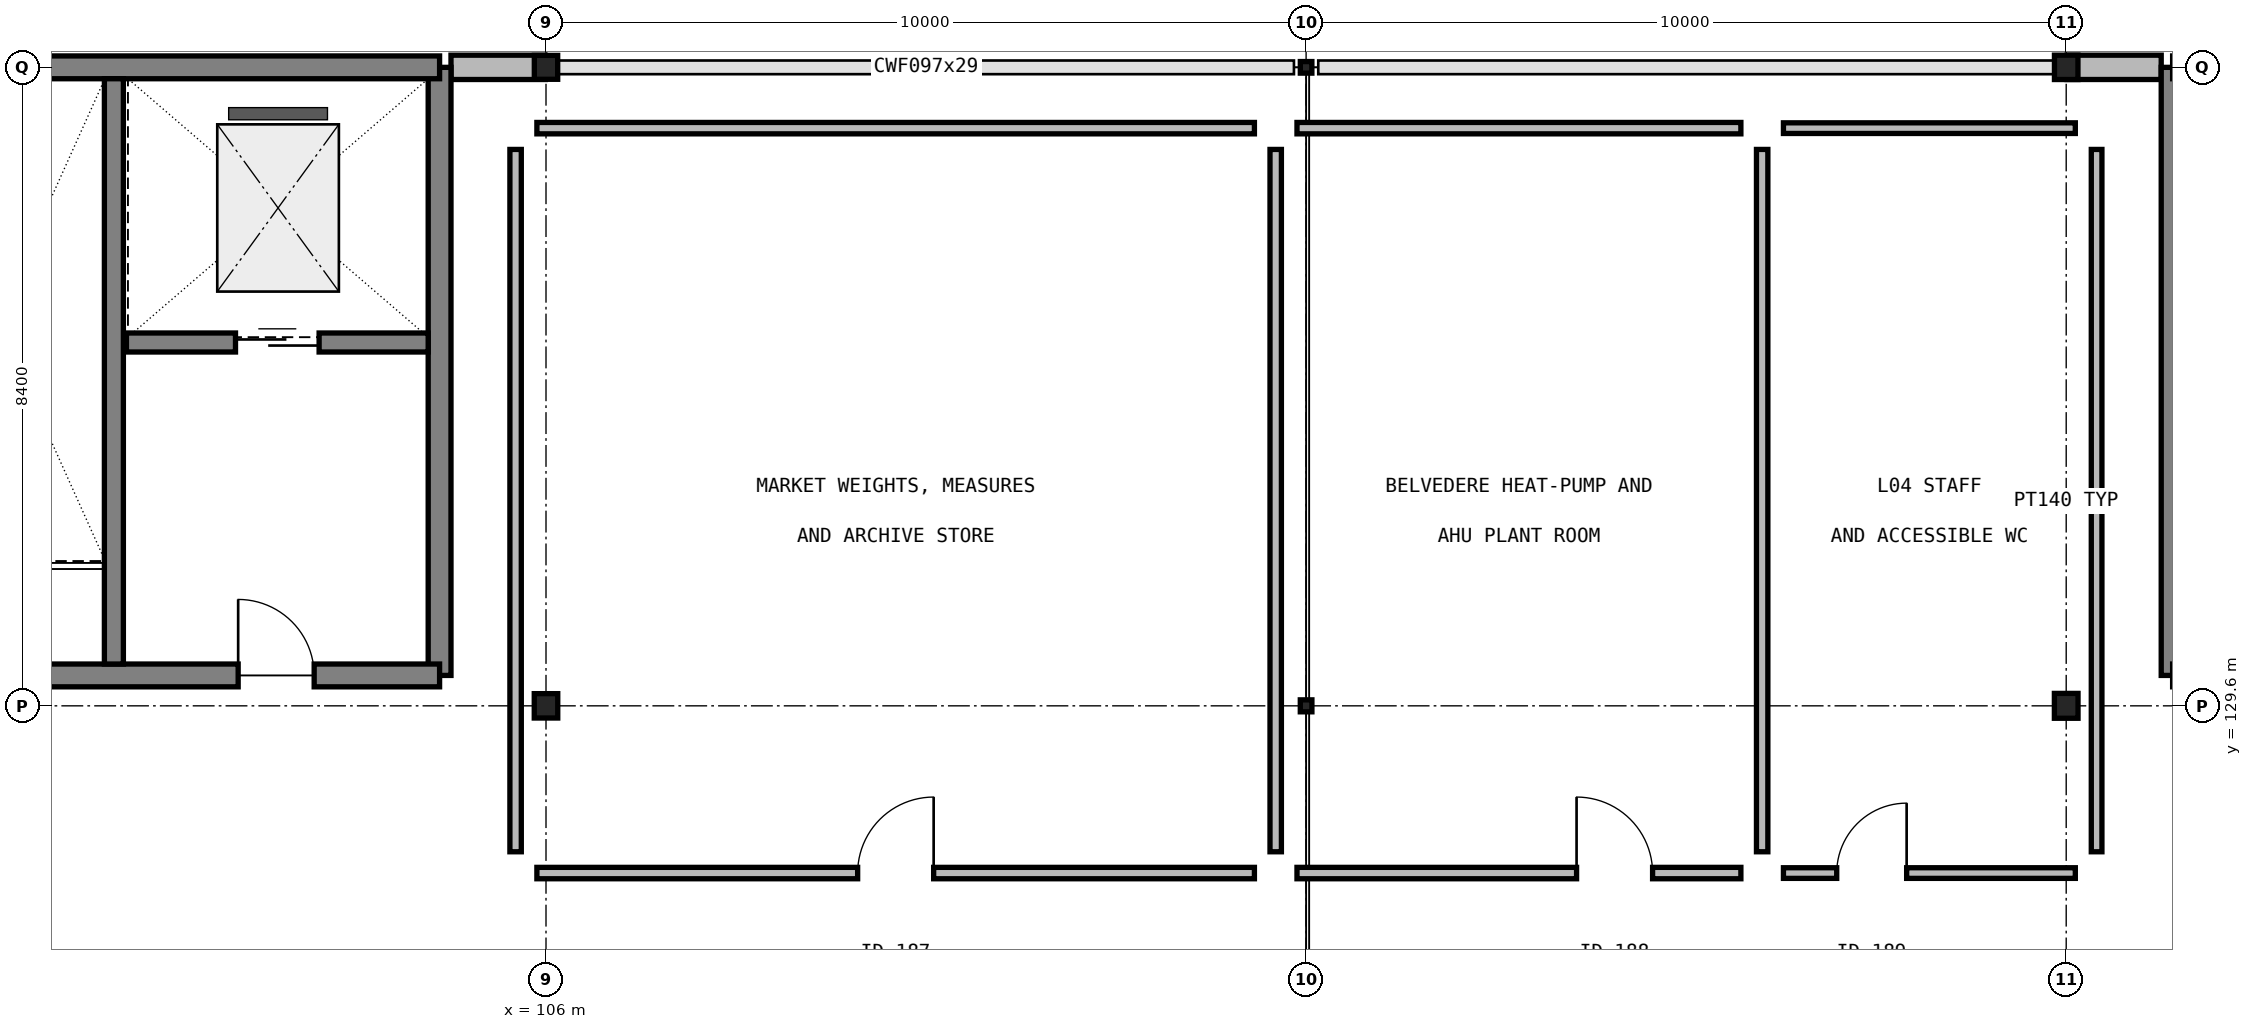
"""IFC4 building model, lengths in metres.
Left out: names, types, materials, properties, quantities, classifications, styles, units other than length and angle.
Written with IfcOpenShell. Run it as: python <this file> out.ifc"""

import sys

from ifc_helpers import new_model, si_unit, direction, frame, frame_2d, origin, origin_2d_with_axis, place, context, subcontext, project, spatial, rectangle, i_section, extrude, element, fill, save


model = new_model("IFC4")
c1 = context("Model", 3, precision=1e-05, world=origin(), true_north=direction((0.0, 1.0)))
c2 = subcontext(c1, "Body", "Model", "MODEL_VIEW")
j1 = project(units=[si_unit("LENGTHUNIT", "METRE"), si_unit("PLANEANGLEUNIT", "RADIAN")], contexts=[c1])
p1 = place(None, origin())
s1 = spatial("IfcSite", under=j1, at=p1, CompositionType="ELEMENT")
p2 = place(p1, origin())
s2 = spatial("IfcBuilding", under=s1, at=p2, CompositionType="ELEMENT")
p3 = place(p2, frame((0.0, 0.0, 15.3)))
s3 = spatial("IfcBuildingStorey", under=s2, at=p3, CompositionType="ELEMENT", Elevation=15.3)
p4 = place(p3, frame((106.0, 129.6, 0.0), z_axis=(0.0, 0.0, 1.0), x_axis=(1.0, 0.0, 0.0)))
e1 = element("IfcColumn", 1, at=p4, inside=s3, PredefinedType="COLUMN", context=c2, shape_type="SweptSolid", body=[
    extrude(i_section(OverallWidth=0.309, OverallDepth=0.321, WebThickness=0.014, FlangeThickness=0.022, FilletRadius=0.017, at=origin_2d_with_axis()), origin(), (0.0, 0.0, 1.0), 3.3),
])
p5 = place(p3, frame((106.0, 138.0, 0.0), z_axis=(0.0, 0.0, 1.0), x_axis=(1.0, 0.0, 0.0)))
e2 = element("IfcColumn", 2, at=p5, inside=s3, PredefinedType="COLUMN", context=c2, shape_type="SweptSolid", body=[
    extrude(i_section(OverallWidth=0.307, OverallDepth=0.315, WebThickness=0.012, FlangeThickness=0.019, FilletRadius=0.017, at=origin_2d_with_axis()), origin(), (0.0, 0.0, 1.0), 3.3),
])
p6 = place(p3, frame((116.0, 129.6, 0.0), z_axis=(0.0, 0.0, 1.0), x_axis=(1.0, 0.0, 0.0)))
e3 = element("IfcColumn", 3, at=p6, inside=s3, PredefinedType="COLUMN", context=c2, shape_type="SweptSolid", body=[
    extrude(i_section(OverallWidth=0.153, OverallDepth=0.158, WebThickness=0.007, FlangeThickness=0.01, FilletRadius=0.009, at=origin_2d_with_axis()), origin(), (0.0, 0.0, 1.0), 3.3),
])
p7 = place(p3, frame((116.0, 138.0, 0.0), z_axis=(0.0, 0.0, 1.0), x_axis=(1.0, 0.0, 0.0)))
e4 = element("IfcColumn", 4, at=p7, inside=s3, PredefinedType="COLUMN", context=c2, shape_type="SweptSolid", body=[
    extrude(i_section(OverallWidth=0.152, OverallDepth=0.152, WebThickness=0.006, FlangeThickness=0.007, FilletRadius=0.009, at=origin_2d_with_axis()), origin(), (0.0, 0.0, 1.0), 3.3),
])
p8 = place(p3, frame((126.0, 129.6, 0.0), z_axis=(0.0, 0.0, 1.0), x_axis=(1.0, 0.0, 0.0)))
e5 = element("IfcColumn", 5, at=p8, inside=s3, PredefinedType="COLUMN", context=c2, shape_type="SweptSolid", body=[
    extrude(i_section(OverallWidth=0.311, OverallDepth=0.327, WebThickness=0.016, FlangeThickness=0.025, FilletRadius=0.017, at=origin_2d_with_axis()), origin(), (0.0, 0.0, 1.0), 3.3),
])
p9 = place(p3, frame((126.0, 138.0, 0.0), z_axis=(0.0, 0.0, 1.0), x_axis=(1.0, 0.0, 0.0)))
e6 = element("IfcColumn", 6, at=p9, inside=s3, PredefinedType="COLUMN", context=c2, shape_type="SweptSolid", body=[
    extrude(i_section(OverallWidth=0.309, OverallDepth=0.321, WebThickness=0.014, FlangeThickness=0.022, FilletRadius=0.017, at=origin_2d_with_axis()), origin(), (0.0, 0.0, 1.0), 3.3),
])
p10 = place(p3, frame((105.99, 138.0, 0.0), z_axis=(0.0, 0.0, 1.0), x_axis=(-1.0, 0.0, 0.0)))
e7 = element("IfcWall", 7, at=p10, inside=s3, PredefinedType="SOLIDWALL", context=c2, shape_type="SweptSolid", body=[
    extrude(rectangle(XDim=1.24, YDim=0.32, at=frame_2d((0.62, 0.0), x_axis=(1.0, 0.0))), origin(), (0.0, 0.0, 1.0), 2.94),
])
p11 = place(p3, frame((127.25, 138.0, 0.0), z_axis=(0.0, 0.0, 1.0), x_axis=(-1.0, 0.0, 0.0)))
e8 = element("IfcWall", 8, at=p11, inside=s3, PredefinedType="SOLIDWALL", context=c2, shape_type="SweptSolid", body=[
    extrude(rectangle(XDim=1.239, YDim=0.32, at=frame_2d((0.62, 0.0), x_axis=(1.0, 0.0))), origin(), (0.0, 0.0, 1.0), 2.94),
])
p12 = place(p3, frame((104.6, 130.0, 0.0), z_axis=(0.0, 0.0, 1.0), x_axis=(0.0, 1.0, 0.0)))
e9 = element("IfcWall", 9, at=p12, inside=s3, PredefinedType="SHEAR", context=c2, shape_type="SweptSolid", body=[
    extrude(rectangle(XDim=8.0, YDim=0.3, at=frame_2d((4.0, 0.0), x_axis=(1.0, 0.0))), origin(), (0.0, 0.0, 1.0), 3.09),
])
p13 = place(p3, frame((97.2, 130.0, 0.0), z_axis=(0.0, 0.0, 1.0), x_axis=(1.0, 0.0, 0.0)))
e10 = element("IfcWall", 10, at=p13, inside=s3, PredefinedType="SHEAR", context=c2, shape_type="SweptSolid", body=[
    extrude(rectangle(XDim=7.4, YDim=0.3, at=frame_2d((3.7, 0.0), x_axis=(1.0, 0.0))), origin(), (0.0, 0.0, 1.0), 3.09),
])
p14 = place(p13, frame((1.1, 0.0, 0.0)))
e11 = element("IfcOpeningElement", 11, at=p14, cuts=e10, PredefinedType="OPENING", context=c2, shape_type="SweptSolid", body=[
    extrude(rectangle(XDim=1.0, YDim=2.15, at=frame_2d((0.5, 1.075), x_axis=(1.0, 0.0))), frame((0.0, 0.16, 0.0), z_axis=(0.0, -1.0, 0.0), x_axis=(1.0, 0.0, 0.0)), (0.0, 0.0, 1.0), 0.32),
])
p15 = place(p13, frame((4.75, 0.0, 0.0)))
e12 = element("IfcOpeningElement", 12, at=p15, cuts=e10, PredefinedType="OPENING", context=c2, shape_type="SweptSolid", body=[
    extrude(rectangle(XDim=1.0, YDim=2.15, at=frame_2d((0.5, 1.075), x_axis=(1.0, 0.0))), frame((0.0, 0.16, 0.0), z_axis=(0.0, -1.0, 0.0), x_axis=(1.0, 0.0, 0.0)), (0.0, 0.0, 1.0), 0.32),
])
p16 = place(p3, frame((104.6, 138.0, 0.0), z_axis=(0.0, 0.0, 1.0), x_axis=(-1.0, 0.0, 0.0)))
e13 = element("IfcWall", 13, at=p16, inside=s3, PredefinedType="SHEAR", context=c2, shape_type="SweptSolid", body=[
    extrude(rectangle(XDim=7.4, YDim=0.3, at=frame_2d((3.7, 0.0), x_axis=(1.0, 0.0))), origin(), (0.0, 0.0, 1.0), 3.09),
])
p17 = place(p3, frame((100.315, 130.15, 0.0), z_axis=(0.0, 0.0, 1.0), x_axis=(0.0, 1.0, 0.0)))
e14 = element("IfcWall", 14, at=p17, inside=s3, PredefinedType="SHEAR", context=c2, shape_type="SweptSolid", body=[
    extrude(rectangle(XDim=7.7, YDim=0.25, at=frame_2d((3.85, 0.0), x_axis=(1.0, 0.0))), origin(), (0.0, 0.0, 1.0), 3.09),
])
p18 = place(p3, frame((100.48, 134.38, 0.0), z_axis=(0.0, 0.0, 1.0), x_axis=(1.0, 0.0, 0.0)))
e15 = element("IfcWall", 15, at=p18, inside=s3, PredefinedType="SHEAR", context=c2, shape_type="SweptSolid", body=[
    extrude(rectangle(XDim=3.97, YDim=0.25, at=frame_2d((1.985, 0.0), x_axis=(1.0, 0.0))), origin(), (0.0, 0.0, 1.0), 3.09),
])
p19 = place(p18, frame((1.435, 0.0, 0.0)))
e16 = element("IfcOpeningElement", 16, at=p19, cuts=e15, PredefinedType="OPENING", context=c2, shape_type="SweptSolid", body=[
    extrude(rectangle(XDim=1.1, YDim=2.15, at=frame_2d((0.55, 1.075), x_axis=(1.0, 0.0))), frame((0.0, 0.135, 0.0), z_axis=(0.0, -1.0, 0.0), x_axis=(1.0, 0.0, 0.0)), (0.0, 0.0, 1.0), 0.27),
])
p20 = place(p3, frame((127.4, 138.0, 0.0), z_axis=(0.0, 0.0, 1.0), x_axis=(0.0, -1.0, 0.0)))
e17 = element("IfcWall", 17, at=p20, inside=s3, PredefinedType="SHEAR", context=c2, shape_type="SweptSolid", body=[
    extrude(rectangle(XDim=8.0, YDim=0.3, at=frame_2d((4.0, 0.0), x_axis=(1.0, 0.0))), origin(), (0.0, 0.0, 1.0), 3.09),
])
p21 = place(p3, frame((134.8, 138.0, 0.0), z_axis=(0.0, 0.0, 1.0), x_axis=(-1.0, 0.0, 0.0)))
e18 = element("IfcWall", 18, at=p21, inside=s3, PredefinedType="SHEAR", context=c2, shape_type="SweptSolid", body=[
    extrude(rectangle(XDim=7.4, YDim=0.3, at=frame_2d((3.7, 0.0), x_axis=(1.0, 0.0))), origin(), (0.0, 0.0, 1.0), 3.09),
])
p22 = place(p3, frame((105.88, 127.4, 0.0), z_axis=(0.0, 0.0, 1.0), x_axis=(1.0, 0.0, 0.0)))
e19 = element("IfcWall", 19, at=p22, inside=s3, PredefinedType="PARTITIONING", context=c2, shape_type="SweptSolid", body=[
    extrude(rectangle(XDim=9.44, YDim=0.15, at=frame_2d((4.72, 0.0), x_axis=(1.0, 0.0))), origin(), (0.0, 0.0, 1.0), 2.47),
])
p23 = place(p22, frame((4.22, 0.0, 0.0)))
e20 = element("IfcOpeningElement", 20, at=p23, cuts=e19, PredefinedType="OPENING", context=c2, shape_type="SweptSolid", body=[
    extrude(rectangle(XDim=1.0, YDim=2.15, at=frame_2d((0.5, 1.075), x_axis=(1.0, 0.0))), frame((0.0, 0.085, 0.0), z_axis=(0.0, -1.0, 0.0), x_axis=(1.0, 0.0, 0.0)), (0.0, 0.0, 1.0), 0.17),
])
p24 = place(p3, frame((115.6, 127.68, 0.0), z_axis=(0.0, 0.0, 1.0), x_axis=(0.0, 1.0, 0.0)))
e21 = element("IfcWall", 21, at=p24, inside=s3, PredefinedType="PARTITIONING", context=c2, shape_type="SweptSolid", body=[
    extrude(rectangle(XDim=9.24, YDim=0.15, at=frame_2d((4.62, 0.0), x_axis=(1.0, 0.0))), origin(), (0.0, 0.0, 1.0), 2.47),
])
p25 = place(p3, frame((115.32, 137.2, 0.0), z_axis=(0.0, 0.0, 1.0), x_axis=(-1.0, 0.0, 0.0)))
e22 = element("IfcWall", 22, at=p25, inside=s3, PredefinedType="PARTITIONING", context=c2, shape_type="SweptSolid", body=[
    extrude(rectangle(XDim=9.44, YDim=0.15, at=frame_2d((4.72, 0.0), x_axis=(1.0, 0.0))), origin(), (0.0, 0.0, 1.0), 2.47),
])
p26 = place(p3, frame((105.6, 136.92, 0.0), z_axis=(0.0, 0.0, 1.0), x_axis=(0.0, -1.0, 0.0)))
e23 = element("IfcWall", 23, at=p26, inside=s3, PredefinedType="PARTITIONING", context=c2, shape_type="SweptSolid", body=[
    extrude(rectangle(XDim=9.24, YDim=0.15, at=frame_2d((4.62, 0.0), x_axis=(1.0, 0.0))), origin(), (0.0, 0.0, 1.0), 2.47),
])
p27 = place(p3, frame((115.88, 127.4, 0.0), z_axis=(0.0, 0.0, 1.0), x_axis=(1.0, 0.0, 0.0)))
e24 = element("IfcWall", 24, at=p27, inside=s3, PredefinedType="PARTITIONING", context=c2, shape_type="SweptSolid", body=[
    extrude(rectangle(XDim=5.84, YDim=0.15, at=frame_2d((2.92, 0.0), x_axis=(1.0, 0.0))), origin(), (0.0, 0.0, 1.0), 2.47),
])
p28 = place(p27, frame((3.678, 0.0, 0.0)))
e25 = element("IfcOpeningElement", 25, at=p28, cuts=e24, PredefinedType="OPENING", context=c2, shape_type="SweptSolid", body=[
    extrude(rectangle(XDim=1.0, YDim=2.15, at=frame_2d((0.5, 1.075), x_axis=(1.0, 0.0))), frame((0.0, 0.085, 0.0), z_axis=(0.0, -1.0, 0.0), x_axis=(1.0, 0.0, 0.0)), (0.0, 0.0, 1.0), 0.17),
])
p29 = place(p3, frame((122.0, 127.68, 0.0), z_axis=(0.0, 0.0, 1.0), x_axis=(0.0, 1.0, 0.0)))
e26 = element("IfcWall", 26, at=p29, inside=s3, PredefinedType="PARTITIONING", context=c2, shape_type="SweptSolid", body=[
    extrude(rectangle(XDim=9.24, YDim=0.15, at=frame_2d((4.62, 0.0), x_axis=(1.0, 0.0))), origin(), (0.0, 0.0, 1.0), 2.47),
])
p30 = place(p3, frame((121.72, 137.2, 0.0), z_axis=(0.0, 0.0, 1.0), x_axis=(-1.0, 0.0, 0.0)))
e27 = element("IfcWall", 27, at=p30, inside=s3, PredefinedType="PARTITIONING", context=c2, shape_type="SweptSolid", body=[
    extrude(rectangle(XDim=5.84, YDim=0.15, at=frame_2d((2.92, 0.0), x_axis=(1.0, 0.0))), origin(), (0.0, 0.0, 1.0), 2.47),
])
p31 = place(p3, frame((122.28, 127.4, 0.0), z_axis=(0.0, 0.0, 1.0), x_axis=(1.0, 0.0, 0.0)))
e28 = element("IfcWall", 28, at=p31, inside=s3, PredefinedType="PLUMBINGWALL", context=c2, shape_type="SweptSolid", body=[
    extrude(rectangle(XDim=3.84, YDim=0.14, at=frame_2d((1.92, 0.0), x_axis=(1.0, 0.0))), origin(), (0.0, 0.0, 1.0), 2.47),
])
p32 = place(p31, frame((0.701, 0.0, 0.0)))
e29 = element("IfcOpeningElement", 29, at=p32, cuts=e28, PredefinedType="OPENING", context=c2, shape_type="SweptSolid", body=[
    extrude(rectangle(XDim=0.92, YDim=2.15, at=frame_2d((0.46, 1.075), x_axis=(1.0, 0.0))), frame((0.0, 0.08, 0.0), z_axis=(0.0, -1.0, 0.0), x_axis=(1.0, 0.0, 0.0)), (0.0, 0.0, 1.0), 0.16),
])
p33 = place(p3, frame((126.4, 127.68, 0.0), z_axis=(0.0, 0.0, 1.0), x_axis=(0.0, 1.0, 0.0)))
e30 = element("IfcWall", 30, at=p33, inside=s3, PredefinedType="PLUMBINGWALL", context=c2, shape_type="SweptSolid", body=[
    extrude(rectangle(XDim=9.24, YDim=0.14, at=frame_2d((4.62, 0.0), x_axis=(1.0, 0.0))), origin(), (0.0, 0.0, 1.0), 2.47),
])
p34 = place(p3, frame((126.12, 137.2, 0.0), z_axis=(0.0, 0.0, 1.0), x_axis=(-1.0, 0.0, 0.0)))
e31 = element("IfcWall", 31, at=p34, inside=s3, PredefinedType="PLUMBINGWALL", context=c2, shape_type="SweptSolid", body=[
    extrude(rectangle(XDim=3.84, YDim=0.14, at=frame_2d((1.92, 0.0), x_axis=(1.0, 0.0))), origin(), (0.0, 0.0, 1.0), 2.47),
])
p35 = place(p15, origin())
e32 = element("IfcDoor", 32, at=p35, inside=s3, OperationType="SINGLE_SWING_LEFT", PredefinedType="DOOR", context=c2, shape_type="SweptSolid", body=[
    extrude(rectangle(XDim=1.0, YDim=2.15, at=frame_2d((0.5, 1.075), x_axis=(1.0, 0.0))), frame((0.0, 0.025, 0.0), z_axis=(0.0, -1.0, 0.0), x_axis=(1.0, 0.0, 0.0)), (0.0, 0.0, 1.0), 0.05),
])
fill(e12, e32)
p36 = place(p19, origin())
e33 = element("IfcDoor", 33, at=p36, inside=s3, OperationType="SLIDING_TO_LEFT", PredefinedType="DOOR", context=c2, shape_type="SweptSolid", body=[
    extrude(rectangle(XDim=1.1, YDim=2.15, at=frame_2d((0.55, 1.075), x_axis=(1.0, 0.0))), frame((0.0, 0.025, 0.0), z_axis=(0.0, -1.0, 0.0), x_axis=(1.0, 0.0, 0.0)), (0.0, 0.0, 1.0), 0.05),
])
fill(e16, e33)
p37 = place(p23, origin())
e34 = element("IfcDoor", 34, at=p37, inside=s3, OperationType="SINGLE_SWING_RIGHT", PredefinedType="DOOR", context=c2, shape_type="SweptSolid", body=[
    extrude(rectangle(XDim=1.0, YDim=2.15, at=frame_2d((0.5, 1.075), x_axis=(1.0, 0.0))), frame((0.0, 0.025, 0.0), z_axis=(0.0, -1.0, 0.0), x_axis=(1.0, 0.0, 0.0)), (0.0, 0.0, 1.0), 0.05),
])
fill(e20, e34)
p38 = place(p28, origin())
e35 = element("IfcDoor", 35, at=p38, inside=s3, OperationType="SINGLE_SWING_LEFT", PredefinedType="DOOR", context=c2, shape_type="SweptSolid", body=[
    extrude(rectangle(XDim=1.0, YDim=2.15, at=frame_2d((0.5, 1.075), x_axis=(1.0, 0.0))), frame((0.0, 0.025, 0.0), z_axis=(0.0, -1.0, 0.0), x_axis=(1.0, 0.0, 0.0)), (0.0, 0.0, 1.0), 0.05),
])
fill(e25, e35)
p39 = place(p32, origin())
e36 = element("IfcDoor", 36, at=p39, inside=s3, OperationType="SINGLE_SWING_RIGHT", PredefinedType="DOOR", context=c2, shape_type="SweptSolid", body=[
    extrude(rectangle(XDim=0.92, YDim=2.15, at=frame_2d((0.46, 1.075), x_axis=(1.0, 0.0))), frame((0.0, 0.025, 0.0), z_axis=(0.0, -1.0, 0.0), x_axis=(1.0, 0.0, 0.0)), (0.0, 0.0, 1.0), 0.05),
])
fill(e29, e36)
save(model, sys.argv[1])
